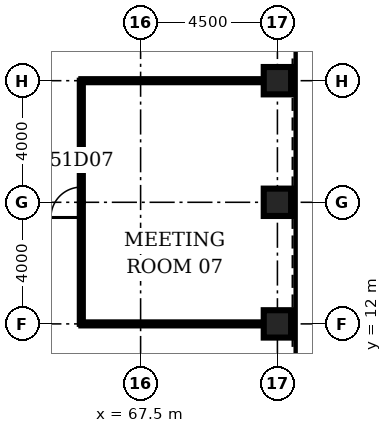
"""IFC4 building model, lengths in metres.
Left out: names, types, materials, properties, quantities, classifications, styles, units other than length and angle.
Written with IfcOpenShell. Run it as: python <this file> out.ifc"""

import sys

from ifc_helpers import new_model, si_unit, direction, frame, frame_2d, origin, origin_2d, place, context, subcontext, project, spatial, rectangle, hollow_rectangle, extrude, element, fill, save


model = new_model("IFC4")
c1 = context("Model", 3, precision=1e-05, world=origin(), true_north=direction((0.0, 1.0)))
c2 = subcontext(c1, "Body", "Model", "MODEL_VIEW")
j1 = project(units=[si_unit("LENGTHUNIT", "METRE"), si_unit("PLANEANGLEUNIT", "RADIAN")], contexts=[c1])
p1 = place(None, origin())
s1 = spatial("IfcSite", under=j1, at=p1, CompositionType="ELEMENT")
p2 = place(p1, origin())
s2 = spatial("IfcBuilding", under=s1, at=p2, CompositionType="ELEMENT")
p3 = place(p2, frame((0.0, 0.0, 227.8)))
s3 = spatial("IfcBuildingStorey", under=s2, at=p3, CompositionType="ELEMENT", Elevation=227.8)
for number, where, z_axis, x_axis in (
    (1, (72.0, 12.0, 0.0), (0.0, 0.0, 1.0), (1.0, 0.0, 0.0)),
    (2, (72.0, 16.0, 0.0), (0.0, 0.0, 1.0), (1.0, 0.0, 0.0)),
    (3, (72.0, 20.0, 0.0), (0.0, 0.0, 1.0), (1.0, 0.0, 0.0)),
):
    element("IfcColumn", number, at=place(p3, frame(where, z_axis=z_axis, x_axis=x_axis)), inside=s3, PredefinedType="COLUMN", context=c2, shape_type="SweptSolid", body=[
        extrude(hollow_rectangle(XDim=0.9, YDim=0.9, WallThickness=0.08, at=origin_2d()), origin(), (0.0, 0.0, 1.0), 4.2),
    ])
for number, where, z_axis, x_axis in (
    (4, (65.55, 12.0, 0.0), (0.0, 0.0, 1.0), (1.0, 0.0, 0.0)),
    (5, (65.55, 20.0, 0.0), (0.0, 0.0, 1.0), (1.0, 0.0, 0.0)),
):
    element("IfcWall", number, at=place(p3, frame(where, z_axis=z_axis, x_axis=x_axis)), inside=s3, PredefinedType="PARTITIONING", context=c2, shape_type="SweptSolid", body=[
        extrude(rectangle(XDim=6.0, YDim=0.1, at=frame_2d((3.0, 0.0))), origin(), (0.0, 0.0, 1.0), 3.0),
    ])
p4 = place(p3, frame((65.55, 12.0, 0.0), z_axis=(0.0, 0.0, 1.0), x_axis=(0.0, 1.0, 0.0)))
e6 = element("IfcWall", 6, at=p4, inside=s3, PredefinedType="PARTITIONING", context=c2, shape_type="SweptSolid", body=[
    extrude(rectangle(XDim=8.0, YDim=0.1, at=frame_2d((4.0, 0.0))), origin(), (0.0, 0.0, 1.0), 3.0),
])
p5 = place(p4, frame((3.5, 0.0, 0.0)))
e7 = element("IfcOpeningElement", 7, at=p5, cuts=e6, PredefinedType="OPENING", context=c2, shape_type="SweptSolid", body=[
    extrude(rectangle(XDim=1.0, YDim=2.1, at=frame_2d((0.5, 1.05))), frame((0.0, 0.06, 0.0), z_axis=(0.0, -1.0, 0.0), x_axis=(1.0, 0.0, 0.0)), (0.0, 0.0, 1.0), 0.12),
])
p6 = place(p5, origin())
e8 = element("IfcDoor", 8, at=p6, inside=s3, OperationType="SINGLE_SWING_LEFT", PredefinedType="DOOR", context=c2, shape_type="SweptSolid", body=[
    extrude(rectangle(XDim=1.0, YDim=2.1, at=frame_2d((0.5, 1.05))), frame((0.0, 0.025, 0.0), z_axis=(0.0, -1.0, 0.0), x_axis=(1.0, 0.0, 0.0)), (0.0, 0.0, 1.0), 0.05),
])
fill(e7, e8)
save(model, sys.argv[1])
